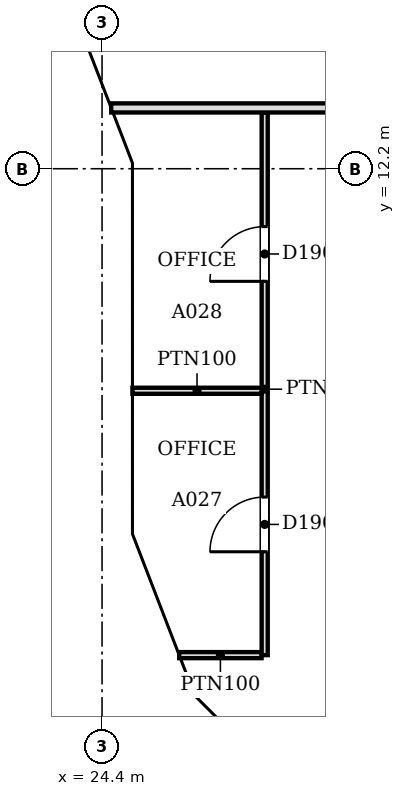
"""IFC4 building model, lengths in metres.
Left out: names, types, materials, properties, quantities, classifications, styles, units other than length and angle.
Written with IfcOpenShell. Run it as: python <this file> out.ifc"""

import sys

from ifc_helpers import new_model, si_unit, direction, frame, frame_2d, origin, place, context, subcontext, project, spatial, polyline, rectangle, outline, extrude, faceted_brep, source, transform, mapped, element, fill, save


model = new_model("IFC4")
c1 = context("Model", 3, precision=1e-05, world=origin(), true_north=direction((0.0, 1.0)))
c2 = subcontext(c1, "Body", "Model", "MODEL_VIEW")
j1 = project(units=[si_unit("LENGTHUNIT", "METRE"), si_unit("PLANEANGLEUNIT", "RADIAN")], contexts=[c1])
p1 = place(None, origin())
s1 = spatial("IfcSite", under=j1, at=p1, CompositionType="ELEMENT")
p2 = place(p1, origin())
s2 = spatial("IfcBuilding", under=s1, at=p2, CompositionType="ELEMENT")
p3 = place(p2, frame((0.0, 0.0, 68.6)))
s3 = spatial("IfcBuildingStorey", under=s2, at=p3, CompositionType="ELEMENT", Elevation=68.6)
m1 = source(origin(), c2, "Body", "Brep", [
    faceted_brep([(3.156, -0.25, 0.056), (0.106, -0.25, 3.736), (0.106, -0.25, 0.0), (3.156, -0.25, 0.0), (0.0, 0.25, 3.736), (0.053, 0.25, 3.8), (3.202, 0.25, 0.0), (0.0, 0.25, 0.0), (0.053, 0.0, 3.8), (3.202, -0.0, 0.0)], [[[0, 1, 2, 3]], [[4, 5, 6, 7]], [[6, 5, 8, 1, 0, 9]], [[5, 4, 8]], [[7, 6, 9, 3, 2]], [[7, 2, 1, 8, 4]], [[3, 9, 0]]]),
])
p4 = place(p3, frame((23.497, 15.234, 0.0), z_axis=(0.0, 0.0, 1.0), x_axis=(0.359913782069, -0.932985567668, 0.0)))
e1 = element("IfcWall", 1, at=p4, inside=s3, PredefinedType="SOLIDWALL", context=c2, shape_type="MappedRepresentation", body=[
    mapped(m1, transform((0.0, 0.0, 0.0), scale=1.0)),
])
m2 = source(origin(), c2, "Body", "SweptSolid", [
    extrude(outline(polyline([(2.671, 0.25), (0.253, 3.167), (0.253, 0.25), (2.671, 0.25)])), frame((0.0, 0.26, 0.0), z_axis=(0.0, -1.0, 0.0), x_axis=(1.0, 0.0, 0.0)), (0.0, 0.0, 1.0), 0.52),
])
p5 = place(p4, origin())
e2 = element("IfcOpeningElement", 2, at=p5, cuts=e1, PredefinedType="OPENING", context=c2, shape_type="MappedRepresentation", body=[
    mapped(m2, transform((0.0, 0.0, 0.0), scale=1.0)),
])
m3 = source(origin(), c2, "Body", "Brep", [
    faceted_brep([(6.1, -0.25, 0.0), (3.096, -0.25, 3.8), (0.047, -0.25, 0.057), (0.047, -0.25, 0.0), (0.0, 0.25, 0.0), (3.096, 0.25, 3.8), (6.053, 0.25, 0.059), (6.053, 0.25, 0.0), (6.1, -0.0, 0.0), (0.0, 0.0, 0.0)], [[[0, 1, 2, 3]], [[4, 5, 6, 7]], [[6, 5, 1, 0, 8]], [[5, 4, 9, 2, 1]], [[4, 7, 8, 0, 3, 9]], [[9, 3, 2]], [[8, 7, 6]]]),
])
p6 = place(p3, frame((24.65, 12.247, 0.0), z_axis=(0.0, 0.0, 1.0), x_axis=(0.0, -1.0, 0.0)))
e3 = element("IfcWall", 3, at=p6, inside=s3, PredefinedType="SOLIDWALL", context=c2, shape_type="MappedRepresentation", body=[
    mapped(m3, transform((0.0, 0.0, 0.0), scale=1.0)),
])
m4 = source(origin(), c2, "Body", "SweptSolid", [
    extrude(outline(polyline([(5.584, 0.25), (3.094, 3.4), (0.526, 0.25), (5.584, 0.25)])), frame((0.0, 0.26, 0.0), z_axis=(0.0, -1.0, 0.0), x_axis=(1.0, 0.0, 0.0)), (0.0, 0.0, 1.0), 0.52),
])
p7 = place(p6, origin())
e4 = element("IfcOpeningElement", 4, at=p7, cuts=e3, PredefinedType="OPENING", context=c2, shape_type="MappedRepresentation", body=[
    mapped(m4, transform((0.0, 0.0, 0.0), scale=1.0)),
])
m5 = source(origin(), c2, "Body", "Brep", [
    faceted_brep([(3.003, -0.25, 3.731), (2.95, -0.25, 3.8), (0.0, -0.25, 0.0), (3.003, -0.25, 0.0), (0.047, 0.25, 0.06), (2.898, 0.25, 3.732), (2.898, 0.25, 0.0), (0.047, 0.25, 0.0), (2.95, 0.0, 3.8), (0.0, 0.0, 0.0)], [[[0, 1, 2, 3]], [[4, 5, 6, 7]], [[8, 1, 0]], [[5, 4, 9, 2, 1, 8]], [[7, 6, 3, 2, 9]], [[7, 9, 4]], [[3, 6, 5, 8, 0]]]),
])
p8 = place(p3, frame((24.65, 6.146, 0.0), z_axis=(0.0, 0.0, 1.0), x_axis=(0.359953949349, -0.932970071518, 0.0)))
e5 = element("IfcWall", 5, at=p8, inside=s3, PredefinedType="SOLIDWALL", context=c2, shape_type="MappedRepresentation", body=[
    mapped(m5, transform((0.0, 0.0, 0.0), scale=1.0)),
])
m6 = source(origin(), c2, "Body", "SweptSolid", [
    extrude(outline(polyline([(2.75, 3.135), (0.511, 0.25), (2.75, 0.25), (2.75, 3.135)])), frame((0.0, 0.26, 0.0), z_axis=(0.0, -1.0, 0.0), x_axis=(1.0, 0.0, 0.0)), (0.0, 0.0, 1.0), 0.52),
])
p9 = place(p8, origin())
e6 = element("IfcOpeningElement", 6, at=p9, cuts=e5, PredefinedType="OPENING", context=c2, shape_type="MappedRepresentation", body=[
    mapped(m6, transform((0.0, 0.0, 0.0), scale=1.0)),
])
m7 = source(origin(), c2, "Body", "Brep", [
    faceted_brep([(2.997, -0.25, 0.0), (0.053, -0.25, 3.8), (0.0, -0.25, 3.732), (0.0, -0.25, 0.0), (0.106, 0.25, 3.731), (2.944, 0.25, 0.068), (2.944, 0.25, 0.0), (0.106, 0.25, 0.0), (0.053, 0.0, 3.8), (2.997, 0.0, 0.0)], [[[0, 1, 2, 3]], [[4, 5, 6, 7]], [[5, 4, 8, 1, 0, 9]], [[2, 1, 8]], [[7, 6, 9, 0, 3]], [[7, 3, 2, 8, 4]], [[9, 6, 5]]]),
])
p10 = place(p3, frame((25.675, 3.431, 0.0), z_axis=(0.0, 0.0, 1.0), x_axis=(0.707106781187, -0.707106781187, 0.0)))
e7 = element("IfcWall", 7, at=p10, inside=s3, PredefinedType="SOLIDWALL", context=c2, shape_type="MappedRepresentation", body=[
    mapped(m7, transform((0.0, 0.0, 0.0), scale=1.0)),
])
m8 = source(origin(), c2, "Body", "SweptSolid", [
    extrude(outline(polyline([(2.487, 0.25), (0.253, 3.134), (0.253, 0.25), (2.487, 0.25)])), frame((0.0, 0.26, 0.0), z_axis=(0.0, -1.0, 0.0), x_axis=(1.0, 0.0, 0.0)), (0.0, 0.0, 1.0), 0.52),
])
p11 = place(p10, origin())
e8 = element("IfcOpeningElement", 8, at=p11, cuts=e7, PredefinedType="OPENING", context=c2, shape_type="MappedRepresentation", body=[
    mapped(m8, transform((0.0, 0.0, 0.0), scale=1.0)),
])
p12 = place(p2, frame((0.0, 0.0, 72.4)))
s4 = spatial("IfcBuildingStorey", under=s2, at=p12, CompositionType="ELEMENT", Elevation=72.4)
m9 = source(origin(), c2, "Body", "Brep", [
    faceted_brep([(3.103, -0.25, 7.544), (0.053, -0.25, 3.864), (0.053, -0.25, 3.736), (3.103, -0.25, 0.056), (0.0, 0.25, 3.8), (3.149, 0.25, 7.6), (3.196, 0.25, 7.543), (3.196, 0.25, 0.057), (3.149, 0.25, 0.0), (3.149, -0.0, 0.0), (3.149, -0.0, 7.6), (0.0, 0.0, 3.8)], [[[0, 1, 2, 3]], [[4, 5, 6, 7, 8]], [[8, 7, 9]], [[6, 5, 10]], [[5, 4, 11, 1, 0, 10]], [[4, 8, 9, 3, 2, 11]], [[11, 2, 1]], [[3, 9, 7, 6, 10, 0]]]),
])
p13 = place(p12, frame((23.517, 15.185, -3.8), z_axis=(0.0, 0.0, 1.0), x_axis=(0.359864468756, -0.933004589553, 0.0)))
e9 = element("IfcWall", 9, at=p13, inside=s4, PredefinedType="SOLIDWALL", context=c2, shape_type="MappedRepresentation", body=[
    mapped(m9, transform((0.0, 0.0, 0.0), scale=1.0)),
])
m10 = source(origin(), c2, "Body", "SweptSolid", [
    extrude(outline(polyline([(2.949, 6.967), (0.325, 3.8), (2.949, 0.633), (2.949, 6.967)])), frame((0.0, 0.26, 0.0), z_axis=(0.0, -1.0, 0.0), x_axis=(1.0, 0.0, 0.0)), (0.0, 0.0, 1.0), 0.52),
])
p14 = place(p13, origin())
e10 = element("IfcOpeningElement", 10, at=p14, cuts=e9, PredefinedType="OPENING", context=c2, shape_type="MappedRepresentation", body=[
    mapped(m10, transform((0.0, 0.0, 0.0), scale=1.0)),
])
m11 = source(origin(), c2, "Body", "Brep", [
    faceted_brep([(0.093, -0.25, 0.057), (3.143, -0.25, 3.8), (0.093, -0.25, 7.543), (0.0, 0.25, 7.544), (0.047, 0.25, 7.6), (3.143, 0.25, 3.8), (0.047, 0.25, 0.0), (0.0, 0.25, 0.056), (0.047, 0.0, 0.0), (0.047, 0.0, 7.6)], [[[0, 1, 2]], [[3, 4, 5, 6, 7]], [[6, 5, 1, 0, 8]], [[5, 4, 9, 2, 1]], [[4, 3, 9]], [[7, 6, 8]], [[7, 8, 0, 2, 9, 3]]]),
])
p15 = place(p12, frame((24.65, 12.293, -3.8), z_axis=(0.0, 0.0, 1.0), x_axis=(0.0, -1.0, 0.0)))
e11 = element("IfcWall", 11, at=p15, inside=s4, PredefinedType="SOLIDWALL", context=c2, shape_type="MappedRepresentation", body=[
    mapped(m11, transform((0.0, 0.0, 0.0), scale=1.0)),
])
m12 = source(origin(), c2, "Body", "SweptSolid", [
    extrude(outline(polyline([(0.247, 0.641), (2.821, 3.8), (0.247, 6.959), (0.247, 0.641)])), frame((0.0, 0.26, 0.0), z_axis=(0.0, -1.0, 0.0), x_axis=(1.0, 0.0, 0.0)), (0.0, 0.0, 1.0), 0.52),
])
p16 = place(p15, origin())
e12 = element("IfcOpeningElement", 12, at=p16, cuts=e11, PredefinedType="OPENING", context=c2, shape_type="MappedRepresentation", body=[
    mapped(m12, transform((0.0, 0.0, 0.0), scale=1.0)),
])
m13 = source(origin(), c2, "Body", "Brep", [
    faceted_brep([(3.003, -0.25, 0.0), (3.05, -0.25, 0.06), (3.05, -0.25, 7.54), (3.003, -0.25, 7.6), (0.0, -0.25, 3.8), (0.0, 0.25, 3.8), (2.957, 0.25, 7.541), (2.957, 0.25, 0.059), (3.003, 0.0, 0.0), (3.003, 0.0, 7.6)], [[[0, 1, 2, 3, 4]], [[5, 6, 7]], [[1, 0, 8]], [[9, 3, 2]], [[6, 5, 4, 3, 9]], [[5, 7, 8, 0, 4]], [[1, 8, 7, 6, 9, 2]]]),
])
p17 = place(p12, frame((24.65, 9.15, -3.8), z_axis=(0.0, 0.0, 1.0), x_axis=(0.0, -1.0, 0.0)))
e13 = element("IfcWall", 13, at=p17, inside=s4, PredefinedType="SOLIDWALL", context=c2, shape_type="MappedRepresentation", body=[
    mapped(m13, transform((0.0, 0.0, 0.0), scale=1.0)),
])
m14 = source(origin(), c2, "Body", "SweptSolid", [
    extrude(outline(polyline([(2.803, 6.944), (0.319, 3.8), (2.803, 0.656), (2.803, 6.944)])), frame((0.0, 0.26, 0.0), z_axis=(0.0, -1.0, 0.0), x_axis=(1.0, 0.0, 0.0)), (0.0, 0.0, 1.0), 0.52),
])
p18 = place(p17, origin())
e14 = element("IfcOpeningElement", 14, at=p18, cuts=e13, PredefinedType="OPENING", context=c2, shape_type="MappedRepresentation", body=[
    mapped(m14, transform((0.0, 0.0, 0.0), scale=1.0)),
])
m15 = source(origin(), c2, "Body", "Brep", [
    faceted_brep([(0.047, -0.25, 0.0), (2.997, -0.25, 3.8), (0.047, -0.25, 7.6), (0.0, -0.25, 7.541), (0.0, -0.25, 0.059), (0.093, 0.25, 7.54), (2.944, 0.25, 3.868), (2.944, 0.25, 3.732), (0.093, 0.25, 0.06), (2.997, 0.0, 3.8), (0.047, 0.0, 0.0), (0.047, 0.0, 7.6)], [[[0, 1, 2, 3, 4]], [[5, 6, 7, 8]], [[8, 7, 9, 1, 0, 10]], [[6, 5, 11, 2, 1, 9]], [[3, 2, 11]], [[10, 0, 4]], [[8, 10, 4, 3, 11, 5]], [[9, 7, 6]]]),
])
p19 = place(p12, frame((24.633, 6.19, -3.8), z_axis=(0.0, 0.0, 1.0), x_axis=(0.359901446078, -0.932990326376, 0.0)))
e15 = element("IfcWall", 15, at=p19, inside=s4, PredefinedType="SOLIDWALL", context=c2, shape_type="MappedRepresentation", body=[
    mapped(m15, transform((0.0, 0.0, 0.0), scale=1.0)),
])
m16 = source(origin(), c2, "Body", "SweptSolid", [
    extrude(outline(polyline([(0.247, 0.665), (2.681, 3.8), (0.247, 6.935), (0.247, 0.665)])), frame((0.0, 0.26, 0.0), z_axis=(0.0, -1.0, 0.0), x_axis=(1.0, 0.0, 0.0)), (0.0, 0.0, 1.0), 0.52),
])
p20 = place(p19, origin())
e16 = element("IfcOpeningElement", 16, at=p20, cuts=e15, PredefinedType="OPENING", context=c2, shape_type="MappedRepresentation", body=[
    mapped(m16, transform((0.0, 0.0, 0.0), scale=1.0)),
])
m17 = source(origin(), c2, "Body", "Brep", [
    faceted_brep([(2.944, -0.25, 0.0), (2.997, -0.25, 0.068), (2.997, -0.25, 7.532), (2.944, -0.25, 7.6), (0.0, -0.25, 3.8), (0.053, 0.25, 3.868), (2.891, 0.25, 7.532), (2.891, 0.25, 0.068), (0.053, 0.25, 3.731), (2.944, 0.0, 0.0), (2.944, 0.0, 7.6), (0.0, 0.0, 3.8)], [[[0, 1, 2, 3, 4]], [[5, 6, 7, 8]], [[1, 0, 9]], [[10, 3, 2]], [[6, 5, 11, 4, 3, 10]], [[8, 7, 9, 0, 4, 11]], [[8, 11, 5]], [[1, 9, 7, 6, 10, 2]]]),
])
p21 = place(p12, frame((25.712, 3.394, -3.8), z_axis=(0.0, 0.0, 1.0), x_axis=(0.707066050402, -0.707147509625, 0.0)))
e17 = element("IfcWall", 17, at=p21, inside=s4, PredefinedType="SOLIDWALL", context=c2, shape_type="MappedRepresentation", body=[
    mapped(m17, transform((0.0, 0.0, 0.0), scale=1.0)),
])
m18 = source(origin(), c2, "Body", "SweptSolid", [
    extrude(outline(polyline([(2.744, 6.934), (0.316, 3.8), (2.744, 0.666), (2.744, 6.934)])), frame((0.0, 0.26, 0.0), z_axis=(0.0, -1.0, 0.0), x_axis=(1.0, 0.0, 0.0)), (0.0, 0.0, 1.0), 0.52),
])
p22 = place(p21, origin())
e18 = element("IfcOpeningElement", 18, at=p22, cuts=e17, PredefinedType="OPENING", context=c2, shape_type="MappedRepresentation", body=[
    mapped(m18, transform((0.0, 0.0, 0.0), scale=1.0)),
])
p23 = place(p3, frame((25.669, 4.2, 0.0), z_axis=(0.0, 0.0, 1.0), x_axis=(1.0, 0.0, 0.0)))
e19 = element("IfcWall", 19, at=p23, inside=s3, PredefinedType="PARTITIONING", context=c2, shape_type="SweptSolid", body=[
    extrude(rectangle(XDim=1.355, YDim=0.1, at=frame_2d((0.678, 0.0))), origin(), (0.0, 0.0, 1.0), 3.067),
])
p24 = place(p3, frame((27.075, 4.2, 0.0), z_axis=(0.0, 0.0, 1.0), x_axis=(0.0, 1.0, 0.0)))
e20 = element("IfcWall", 20, at=p24, inside=s3, PredefinedType="PARTITIONING", context=c2, shape_type="SweptSolid", body=[
    extrude(rectangle(XDim=8.924, YDim=0.1, at=frame_2d((4.462, 0.0))), origin(), (0.0, 0.0, 1.0), 3.067),
])
m19 = source(origin(), c2, "Body", "SweptSolid", [
    extrude(rectangle(XDim=0.9, YDim=2.1, at=frame_2d((0.45, 1.05))), frame((0.0, 0.06, 0.0), z_axis=(0.0, -1.0, 0.0), x_axis=(1.0, 0.0, 0.0)), (0.0, 0.0, 1.0), 0.12),
])
p25 = place(p24, frame((6.148, 0.0, 0.0)))
e21 = element("IfcOpeningElement", 21, at=p25, cuts=e20, PredefinedType="OPENING", context=c2, shape_type="MappedRepresentation", body=[
    mapped(m19, transform((0.0, 0.0, 0.0), scale=1.0)),
])
p26 = place(p24, frame((1.7, 0.0, 0.0)))
e22 = element("IfcOpeningElement", 22, at=p26, cuts=e20, PredefinedType="OPENING", context=c2, shape_type="MappedRepresentation", body=[
    mapped(m19, transform((0.0, 0.0, 0.0), scale=1.0)),
])
p27 = place(p3, frame((24.9, 8.548, 0.0), z_axis=(0.0, 0.0, 1.0), x_axis=(1.0, 0.0, 0.0)))
e23 = element("IfcWall", 23, at=p27, inside=s3, PredefinedType="PARTITIONING", context=c2, shape_type="SweptSolid", body=[
    extrude(rectangle(XDim=2.124, YDim=0.1, at=frame_2d((1.062, 0.0))), origin(), (0.0, 0.0, 1.0), 3.067),
])
p28 = place(p3, frame((24.55, 13.2, 0.0), z_axis=(0.0, 0.0, 1.0), x_axis=(1.0, 0.0, 0.0)))
e24 = element("IfcWall", 24, at=p28, inside=s3, PredefinedType="PARTITIONING", context=c2, shape_type="SweptSolid", body=[
    extrude(rectangle(XDim=20.374, YDim=0.15, at=frame_2d((10.187, 0.0))), origin(), (0.0, 0.0, 1.0), 3.067),
])
m20 = source(origin(), c2, "Body", "SweptSolid", [
    extrude(rectangle(XDim=0.9, YDim=2.1, at=frame_2d((0.45, 1.05))), frame((0.0, 0.025, 0.0), z_axis=(0.0, -1.0, 0.0), x_axis=(1.0, 0.0, 0.0)), (0.0, 0.0, 1.0), 0.05),
])
p29 = place(p25, origin())
e25 = element("IfcDoor", 25, at=p29, inside=s3, OperationType="SINGLE_SWING_LEFT", PredefinedType="DOOR", context=c2, shape_type="MappedRepresentation", body=[
    mapped(m20, transform((0.0, 0.0, 0.0), scale=1.0)),
])
fill(e21, e25)
p30 = place(p26, origin())
e26 = element("IfcDoor", 26, at=p30, inside=s3, OperationType="SINGLE_SWING_LEFT", PredefinedType="DOOR", context=c2, shape_type="MappedRepresentation", body=[
    mapped(m20, transform((0.0, 0.0, 0.0), scale=1.0)),
])
fill(e22, e26)
save(model, sys.argv[1])
